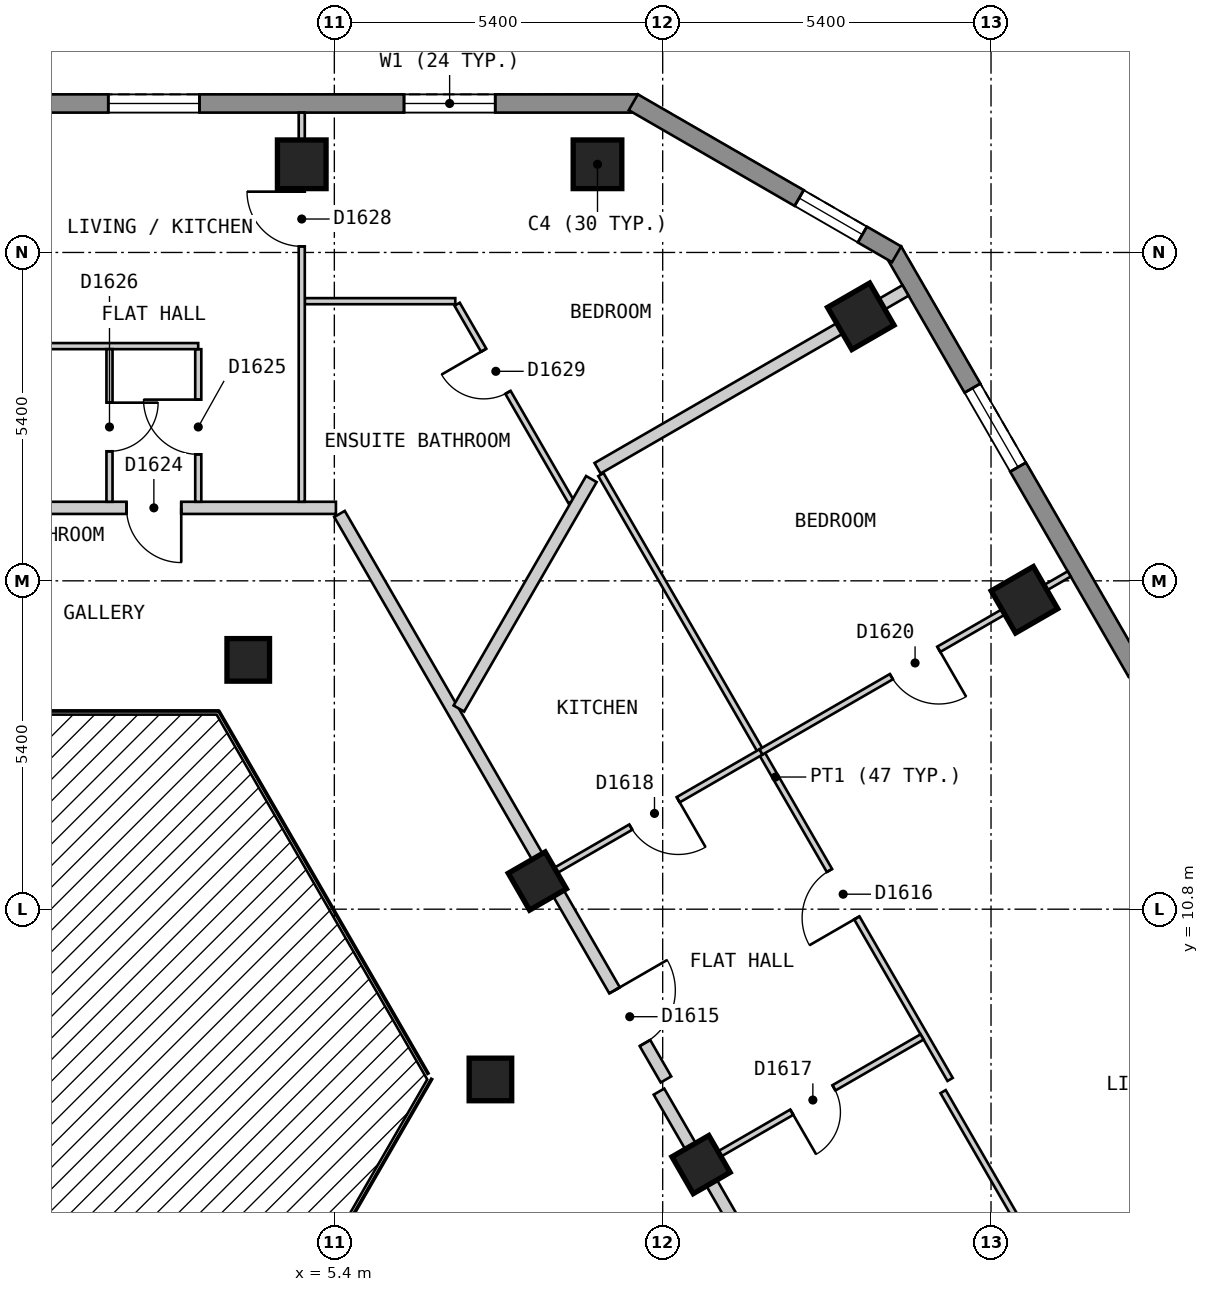
"""IFC4 building model, lengths in metres.
Left out: names, types, materials, properties, quantities, classifications, styles, units other than length and angle.
Written with IfcOpenShell. Run it as: python <this file> out.ifc"""

import sys

from ifc_helpers import new_model, si_unit, direction, frame, frame_2d, origin, origin_2d, place, context, subcontext, project, spatial, polyline, rectangle, outline, extrude, element, fill, save


model = new_model("IFC4")
c1 = context("Model", 3, precision=1e-05, world=origin(), true_north=direction((0.0, 1.0)))
c2 = subcontext(c1, "Body", "Model", "MODEL_VIEW")
j1 = project(units=[si_unit("LENGTHUNIT", "METRE"), si_unit("PLANEANGLEUNIT", "RADIAN")], contexts=[c1])
p1 = place(None, origin())
s1 = spatial("IfcSite", under=j1, at=p1, CompositionType="ELEMENT")
p2 = place(p1, origin())
s2 = spatial("IfcBuilding", under=s1, at=p2, CompositionType="ELEMENT")
p3 = place(p2, frame((0.0, 0.0, 163.2)))
s3 = spatial("IfcBuildingStorey", under=s2, at=p3, CompositionType="ELEMENT", Elevation=163.2)
for number, where, z_axis, x_axis in (
    (1, (9.728, 23.05, 0.0), (0.0, 0.0, 1.0), (-1.0, 0.0, 0.0)),
    (2, (4.864, 23.05, 0.0), (0.0, 0.0, 1.0), (-1.0, 0.0, 0.0)),
    (3, (16.75, 15.888, 0.0), (0.0, 0.0, 1.0), (-0.5, 0.866, 0.0)),
    (4, (14.058, 20.55, 0.0), (0.0, 0.0, 1.0), (-0.5, 0.866, 0.0)),
):
    element("IfcColumn", number, at=place(p3, frame(where, z_axis=z_axis, x_axis=x_axis)), inside=s3, PredefinedType="COLUMN", context=c2, shape_type="SweptSolid", body=[
        extrude(rectangle(XDim=0.8, YDim=0.8, at=origin_2d()), origin(), (0.0, 0.0, 1.0), 3.0),
    ])
for number, where, z_axis, x_axis in (
    (5, (11.431, 6.6, 0.0), (0.0, 0.0, 1.0), (-0.5, 0.866, 0.0)),
    (6, (7.967, 8.0, 0.0), (0.0, 0.0, 1.0), (1.0, 0.0, 0.0)),
    (7, (8.739, 11.263, 0.0), (0.0, 0.0, 1.0), (-0.5, 0.866, 0.0)),
    (8, (3.984, 14.9, 0.0), (0.0, 0.0, 1.0), (1.0, 0.0, 0.0)),
):
    element("IfcColumn", number, at=place(p3, frame(where, z_axis=z_axis, x_axis=x_axis)), inside=s3, PredefinedType="COLUMN", context=c2, shape_type="SweptSolid", body=[
        extrude(rectangle(XDim=0.7, YDim=0.7, at=origin_2d()), origin(), (0.0, 0.0, 1.0), 3.0),
    ])
p4 = place(p3, frame((10.392, 24.05, 0.0), z_axis=(0.0, 0.0, 1.0), x_axis=(-1.0, 0.0, 0.0)))
e9 = element("IfcWall", 9, at=p4, inside=s3, PredefinedType="SOLIDWALL", context=c2, shape_type="SweptSolid", body=[
    extrude(outline(polyline([(0.0, -0.15), (20.784, -0.15), (20.704, 0.15), (0.08, 0.15), (0.0, -0.15)])), origin(), (0.0, 0.0, 1.0), 2.7),
])
p5 = place(p4, frame((2.346, 0.0, 0.15)))
e10 = element("IfcOpeningElement", 10, at=p5, cuts=e9, PredefinedType="OPENING", context=c2, shape_type="SweptSolid", body=[
    extrude(rectangle(XDim=1.5, YDim=2.1, at=frame_2d((0.75, 1.05))), frame((0.0, 0.16, 0.0), z_axis=(0.0, -1.0, 0.0), x_axis=(1.0, 0.0, 0.0)), (0.0, 0.0, 1.0), 0.32),
])
p6 = place(p4, frame((7.21, 0.0, 0.15)))
e11 = element("IfcOpeningElement", 11, at=p6, cuts=e9, PredefinedType="OPENING", context=c2, shape_type="SweptSolid", body=[
    extrude(rectangle(XDim=1.5, YDim=2.1, at=frame_2d((0.75, 1.05))), frame((0.0, 0.16, 0.0), z_axis=(0.0, -1.0, 0.0), x_axis=(1.0, 0.0, 0.0)), (0.0, 0.0, 1.0), 0.32),
])
p7 = place(p4, frame((12.074, 0.0, 0.15)))
e12 = element("IfcOpeningElement", 12, at=p7, cuts=e9, PredefinedType="OPENING", context=c2, shape_type="SweptSolid", body=[
    extrude(rectangle(XDim=1.5, YDim=2.1, at=frame_2d((0.75, 1.05))), frame((0.0, 0.16, 0.0), z_axis=(0.0, -1.0, 0.0), x_axis=(1.0, 0.0, 0.0)), (0.0, 0.0, 1.0), 0.32),
])
p8 = place(p4, frame((16.938, 0.0, 0.15)))
e13 = element("IfcOpeningElement", 13, at=p8, cuts=e9, PredefinedType="OPENING", context=c2, shape_type="SweptSolid", body=[
    extrude(rectangle(XDim=1.5, YDim=2.1, at=frame_2d((0.75, 1.05))), frame((0.0, 0.16, 0.0), z_axis=(0.0, -1.0, 0.0), x_axis=(1.0, 0.0, 0.0)), (0.0, 0.0, 1.0), 0.32),
])
p9 = place(p3, frame((26.024, 1.825, 0.0), z_axis=(0.0, 0.0, 1.0), x_axis=(-0.500010537973, 0.866019319597, 0.0)))
e14 = element("IfcWall", 14, at=p9, inside=s3, PredefinedType="SOLIDWALL", context=c2, shape_type="SweptSolid", body=[
    extrude(outline(polyline([(0.0, -0.15), (22.863, -0.15), (22.783, 0.15), (0.08, 0.15), (0.0, -0.15)])), origin(), (0.0, 0.0, 1.0), 2.7),
])
p10 = place(p9, frame((2.606, 0.0, 0.15)))
e15 = element("IfcOpeningElement", 15, at=p10, cuts=e14, PredefinedType="OPENING", context=c2, shape_type="SweptSolid", body=[
    extrude(rectangle(XDim=1.5, YDim=2.1, at=frame_2d((0.75, 1.05))), frame((0.0, 0.16, 0.0), z_axis=(0.0, -1.0, 0.0), x_axis=(1.0, 0.0, 0.0)), (0.0, 0.0, 1.0), 0.32),
])
p11 = place(p9, frame((7.99, 0.0, 0.15)))
e16 = element("IfcOpeningElement", 16, at=p11, cuts=e14, PredefinedType="OPENING", context=c2, shape_type="SweptSolid", body=[
    extrude(rectangle(XDim=1.5, YDim=2.1, at=frame_2d((0.75, 1.05))), frame((0.0, 0.16, 0.0), z_axis=(0.0, -1.0, 0.0), x_axis=(1.0, 0.0, 0.0)), (0.0, 0.0, 1.0), 0.32),
])
p12 = place(p9, frame((13.373, 0.0, 0.15)))
e17 = element("IfcOpeningElement", 17, at=p12, cuts=e14, PredefinedType="OPENING", context=c2, shape_type="SweptSolid", body=[
    extrude(rectangle(XDim=1.5, YDim=2.1, at=frame_2d((0.75, 1.05))), frame((0.0, 0.16, 0.0), z_axis=(0.0, -1.0, 0.0), x_axis=(1.0, 0.0, 0.0)), (0.0, 0.0, 1.0), 0.32),
])
p13 = place(p9, frame((18.758, 0.0, 0.15)))
e18 = element("IfcOpeningElement", 18, at=p13, cuts=e14, PredefinedType="OPENING", context=c2, shape_type="SweptSolid", body=[
    extrude(rectangle(XDim=1.5, YDim=2.1, at=frame_2d((0.75, 1.05))), frame((0.0, 0.16, 0.0), z_axis=(0.0, -1.0, 0.0), x_axis=(1.0, 0.0, 0.0)), (0.0, 0.0, 1.0), 0.32),
])
p14 = place(p3, frame((14.647, 21.57, 0.0), z_axis=(0.0, 0.0, 1.0), x_axis=(-0.866022959057, 0.500004234368, 0.0)))
e19 = element("IfcWall", 19, at=p14, inside=s3, PredefinedType="SOLIDWALL", context=c2, shape_type="SweptSolid", body=[
    extrude(outline(polyline([(0.0, -0.15), (5.0, -0.15), (4.92, 0.15), (0.08, 0.15), (0.0, -0.15)])), origin(), (0.0, 0.0, 1.0), 2.7),
])
p15 = place(p14, frame((0.65, 0.0, 0.15)))
e20 = element("IfcOpeningElement", 20, at=p15, cuts=e19, PredefinedType="OPENING", context=c2, shape_type="SweptSolid", body=[
    extrude(rectangle(XDim=1.2, YDim=2.1, at=frame_2d((0.6, 1.05))), frame((0.0, 0.16, 0.0), z_axis=(0.0, -1.0, 0.0), x_axis=(1.0, 0.0, 0.0)), (0.0, 0.0, 1.0), 0.32),
])
p16 = place(p3, frame((10.739, 7.8, 0.0), z_axis=(0.0, 0.0, 1.0), x_axis=(0.499964311759, -0.86604600742, 0.0)))
e21 = element("IfcWall", 21, at=p16, inside=s3, PredefinedType="PARTITIONING", context=c2, shape_type="SweptSolid", body=[
    extrude(rectangle(XDim=9.583, YDim=0.2, at=frame_2d((4.792, 0.0))), origin(), (0.0, 0.0, 1.0), 2.7),
])
p17 = place(p3, frame((5.485, 17.3, 0.0), z_axis=(0.0, 0.0, 1.0), x_axis=(0.499965832213, -0.866045129667, 0.0)))
e22 = element("IfcWall", 22, at=p17, inside=s3, PredefinedType="PARTITIONING", context=c2, shape_type="SweptSolid", body=[
    extrude(rectangle(XDim=10.739, YDim=0.2, at=frame_2d((5.369, 0.0))), origin(), (0.0, 0.0, 1.0), 2.7),
])
p18 = place(p17, frame((9.047, 0.0, 0.0)))
e23 = element("IfcOpeningElement", 23, at=p18, cuts=e22, PredefinedType="OPENING", context=c2, shape_type="SweptSolid", body=[
    extrude(rectangle(XDim=1.0, YDim=2.1, at=frame_2d((0.5, 1.05))), frame((0.0, 0.11, 0.0), z_axis=(0.0, -1.0, 0.0), x_axis=(1.0, 0.0, 0.0)), (0.0, 0.0, 1.0), 0.22),
])
p19 = place(p3, frame((-5.312, 17.4, 0.0), z_axis=(0.0, 0.0, 1.0), x_axis=(1.0, 0.0, 0.0)))
e24 = element("IfcWall", 24, at=p19, inside=s3, PredefinedType="PARTITIONING", context=c2, shape_type="SweptSolid", body=[
    extrude(rectangle(XDim=10.738, YDim=0.2, at=frame_2d((5.369, 0.0))), origin(), (0.0, 0.0, 1.0), 2.7),
])
p20 = place(p19, frame((7.294, 0.0, 0.0)))
e25 = element("IfcOpeningElement", 25, at=p20, cuts=e24, PredefinedType="OPENING", context=c2, shape_type="SweptSolid", body=[
    extrude(rectangle(XDim=0.9, YDim=2.1, at=frame_2d((0.45, 1.05))), frame((0.0, 0.11, 0.0), z_axis=(0.0, -1.0, 0.0), x_axis=(1.0, 0.0, 0.0)), (0.0, 0.0, 1.0), 0.22),
])
p21 = place(p3, frame((7.419, 20.749, 0.0), z_axis=(0.0, 0.0, 1.0), x_axis=(0.499917691695, -0.866072919292, 0.0)))
e26 = element("IfcWall", 26, at=p21, inside=s3, PredefinedType="PARTITIONING", context=c2, shape_type="SweptSolid", body=[
    extrude(rectangle(XDim=3.753, YDim=0.1, at=frame_2d((1.876, 0.0))), origin(), (0.0, 0.0, 1.0), 2.7),
])
p22 = place(p21, frame((0.874, 0.0, 0.0)))
e27 = element("IfcOpeningElement", 27, at=p22, cuts=e26, PredefinedType="OPENING", context=c2, shape_type="SweptSolid", body=[
    extrude(rectangle(XDim=0.8, YDim=2.1, at=frame_2d((0.4, 1.05))), frame((0.0, 0.06, 0.0), z_axis=(0.0, -1.0, 0.0), x_axis=(1.0, 0.0, 0.0)), (0.0, 0.0, 1.0), 0.12),
])
p23 = place(p3, frame((15.412, 7.8, 0.0), z_axis=(0.0, 0.0, 1.0), x_axis=(0.499882970317, -0.866092960361, 0.0)))
e28 = element("IfcWall", 28, at=p23, inside=s3, PredefinedType="PARTITIONING", context=c2, shape_type="SweptSolid", body=[
    extrude(rectangle(XDim=4.433, YDim=0.1, at=frame_2d((2.216, 0.0))), origin(), (0.0, 0.0, 1.0), 2.7),
])
p24 = place(p3, frame((9.784, 17.947, 0.0), z_axis=(0.0, 0.0, 1.0), x_axis=(0.500016228266, -0.866016034188, 0.0)))
e29 = element("IfcWall", 29, at=p24, inside=s3, PredefinedType="PARTITIONING", context=c2, shape_type="SweptSolid", body=[
    extrude(rectangle(XDim=11.486, YDim=0.1, at=frame_2d((5.743, 0.0))), origin(), (0.0, 0.0, 1.0), 2.7),
])
p25 = place(p24, frame((7.518, 0.0, 0.0)))
e30 = element("IfcOpeningElement", 30, at=p25, cuts=e29, PredefinedType="OPENING", context=c2, shape_type="SweptSolid", body=[
    extrude(rectangle(XDim=0.9, YDim=2.1, at=frame_2d((0.45, 1.05))), frame((0.0, 0.06, 0.0), z_axis=(0.0, -1.0, 0.0), x_axis=(1.0, 0.0, 0.0)), (0.0, 0.0, 1.0), 0.12),
])
p26 = place(p3, frame((3.162, 20.009, 0.0), z_axis=(0.0, 0.0, 1.0), x_axis=(0.0, -1.0, 0.0)))
e31 = element("IfcWall", 31, at=p26, inside=s3, PredefinedType="PARTITIONING", context=c2, shape_type="SweptSolid", body=[
    extrude(rectangle(XDim=2.509, YDim=0.1, at=frame_2d((1.254, 0.0))), origin(), (0.0, 0.0, 1.0), 2.7),
])
p27 = place(p26, frame((0.829, 0.0, 0.0)))
e32 = element("IfcOpeningElement", 32, at=p27, cuts=e31, PredefinedType="OPENING", context=c2, shape_type="SweptSolid", body=[
    extrude(rectangle(XDim=0.9, YDim=2.1, at=frame_2d((0.45, 1.05))), frame((0.0, 0.06, 0.0), z_axis=(0.0, -1.0, 0.0), x_axis=(1.0, 0.0, 0.0)), (0.0, 0.0, 1.0), 0.12),
])
p28 = place(p3, frame((0.05, 20.06, 0.0), z_axis=(0.0, 0.0, 1.0), x_axis=(1.0, 0.0, 0.0)))
e33 = element("IfcWall", 33, at=p28, inside=s3, PredefinedType="PARTITIONING", context=c2, shape_type="SweptSolid", body=[
    extrude(rectangle(XDim=3.111, YDim=0.1, at=frame_2d((1.555, 0.0))), origin(), (0.0, 0.0, 1.0), 2.7),
])
p29 = place(p3, frame((4.914, 20.799, 0.0), z_axis=(0.0, 0.0, 1.0), x_axis=(1.0, 0.0, 0.0)))
e34 = element("IfcWall", 34, at=p29, inside=s3, PredefinedType="PARTITIONING", context=c2, shape_type="SweptSolid", body=[
    extrude(rectangle(XDim=2.475, YDim=0.1, at=frame_2d((1.237, 0.0))), origin(), (0.0, 0.0, 1.0), 2.7),
])
p30 = place(p3, frame((4.864, 17.5, 0.0), z_axis=(0.0, 0.0, 1.0), x_axis=(0.0, 1.0, 0.0)))
e35 = element("IfcWall", 35, at=p30, inside=s3, PredefinedType="PARTITIONING", context=c2, shape_type="SweptSolid", body=[
    extrude(rectangle(XDim=6.4, YDim=0.1, at=frame_2d((3.2, 0.0))), origin(), (0.0, 0.0, 1.0), 2.7),
])
p31 = place(p30, frame((4.2, 0.0, 0.0)))
e36 = element("IfcOpeningElement", 36, at=p31, cuts=e35, PredefinedType="OPENING", context=c2, shape_type="SweptSolid", body=[
    extrude(rectangle(XDim=0.9, YDim=2.1, at=frame_2d((0.45, 1.05))), frame((0.0, 0.06, 0.0), z_axis=(0.0, -1.0, 0.0), x_axis=(1.0, 0.0, 0.0)), (0.0, 0.0, 1.0), 0.12),
])
p32 = place(p3, frame((1.702, 17.5, 0.0), z_axis=(0.0, 0.0, 1.0), x_axis=(0.0, 1.0, 0.0)))
e37 = element("IfcWall", 37, at=p32, inside=s3, PredefinedType="PARTITIONING", context=c2, shape_type="SweptSolid", body=[
    extrude(rectangle(XDim=2.51, YDim=0.1, at=frame_2d((1.255, 0.0))), origin(), (0.0, 0.0, 1.0), 2.7),
])
p33 = place(p32, frame((0.83, 0.0, 0.0)))
e38 = element("IfcOpeningElement", 38, at=p33, cuts=e37, PredefinedType="OPENING", context=c2, shape_type="SweptSolid", body=[
    extrude(rectangle(XDim=0.8, YDim=2.1, at=frame_2d((0.4, 1.05))), frame((0.0, 0.06, 0.0), z_axis=(0.0, -1.0, 0.0), x_axis=(1.0, 0.0, 0.0)), (0.0, 0.0, 1.0), 0.12),
])
p34 = place(p3, frame((14.21, 1.987, 0.0), z_axis=(0.0, 0.0, 1.0), x_axis=(0.866022959057, 0.500004234368, 0.0)))
e39 = element("IfcWall", 39, at=p34, inside=s3, PredefinedType="PARTITIONING", context=c2, shape_type="SweptSolid", body=[
    extrude(rectangle(XDim=10.0, YDim=0.1, at=frame_2d((5.0, 0.0))), origin(), (0.0, 0.0, 1.0), 2.7),
])
p35 = place(p34, frame((6.523, 0.0, 0.0)))
e40 = element("IfcOpeningElement", 40, at=p35, cuts=e39, PredefinedType="OPENING", context=c2, shape_type="SweptSolid", body=[
    extrude(rectangle(XDim=0.9, YDim=2.1, at=frame_2d((0.45, 1.05))), frame((0.0, 0.06, 0.0), z_axis=(0.0, -1.0, 0.0), x_axis=(1.0, 0.0, 0.0)), (0.0, 0.0, 1.0), 0.12),
])
p36 = place(p3, frame((11.518, 6.65, 0.0), z_axis=(0.0, 0.0, 1.0), x_axis=(0.865949381454, 0.500131651427, 0.0)))
e41 = element("IfcWall", 41, at=p36, inside=s3, PredefinedType="PARTITIONING", context=c2, shape_type="SweptSolid", body=[
    extrude(rectangle(XDim=4.097, YDim=0.1, at=frame_2d((2.049, 0.0))), origin(), (0.0, 0.0, 1.0), 2.7),
])
p37 = place(p36, frame((1.623, 0.0, 0.0)))
e42 = element("IfcOpeningElement", 42, at=p37, cuts=e41, PredefinedType="OPENING", context=c2, shape_type="SweptSolid", body=[
    extrude(rectangle(XDim=0.8, YDim=2.1, at=frame_2d((0.4, 1.05))), frame((0.0, 0.06, 0.0), z_axis=(0.0, -1.0, 0.0), x_axis=(1.0, 0.0, 0.0)), (0.0, 0.0, 1.0), 0.12),
])
p38 = place(p3, frame((8.999, 11.413, 0.0), z_axis=(0.0, 0.0, 1.0), x_axis=(0.866076396086, 0.499911668341, 0.0)))
e43 = element("IfcWall", 43, at=p38, inside=s3, PredefinedType="PARTITIONING", context=c2, shape_type="SweptSolid", body=[
    extrude(rectangle(XDim=3.947, YDim=0.1, at=frame_2d((1.973, 0.0))), origin(), (0.0, 0.0, 1.0), 2.7),
])
p39 = place(p38, frame((1.474, 0.0, 0.0)))
e44 = element("IfcOpeningElement", 44, at=p39, cuts=e43, PredefinedType="OPENING", context=c2, shape_type="SweptSolid", body=[
    extrude(rectangle(XDim=0.9, YDim=2.1, at=frame_2d((0.45, 1.05))), frame((0.0, 0.06, 0.0), z_axis=(0.0, -1.0, 0.0), x_axis=(1.0, 0.0, 0.0)), (0.0, 0.0, 1.0), 0.12),
])
p40 = place(p3, frame((7.448, 14.1, 0.0), z_axis=(0.0, 0.0, 1.0), x_axis=(0.500013426303, 0.866017651966, 0.0)))
e45 = element("IfcWall", 45, at=p40, inside=s3, PredefinedType="PARTITIONING", context=c2, shape_type="SweptSolid", body=[
    extrude(rectangle(XDim=4.358, YDim=0.2, at=frame_2d((2.179, 0.0))), origin(), (0.0, 0.0, 1.0), 2.7),
])
p41 = place(p3, frame((9.729, 18.051, 0.0), z_axis=(0.0, 0.0, 1.0), x_axis=(0.866038213712, 0.499977811898, 0.0)))
e46 = element("IfcWall", 46, at=p41, inside=s3, PredefinedType="PARTITIONING", context=c2, shape_type="SweptSolid", body=[
    extrude(rectangle(XDim=5.848, YDim=0.2, at=frame_2d((2.924, 0.0))), origin(), (0.0, 0.0, 1.0), 2.7),
])
p42 = place(p3, frame((12.417, 13.386, 0.0), z_axis=(0.0, 0.0, 1.0), x_axis=(0.86599873886, 0.50004618216, 0.0)))
e47 = element("IfcWall", 47, at=p42, inside=s3, PredefinedType="PARTITIONING", context=c2, shape_type="SweptSolid", body=[
    extrude(rectangle(XDim=5.854, YDim=0.1, at=frame_2d((2.927, 0.0))), origin(), (0.0, 0.0, 1.0), 2.7),
])
p43 = place(p42, frame((2.476, 0.0, 0.0)))
e48 = element("IfcOpeningElement", 48, at=p43, cuts=e47, PredefinedType="OPENING", context=c2, shape_type="SweptSolid", body=[
    extrude(rectangle(XDim=0.9, YDim=2.1, at=frame_2d((0.45, 1.05))), frame((0.0, 0.06, 0.0), z_axis=(0.0, -1.0, 0.0), x_axis=(1.0, 0.0, 0.0)), (0.0, 0.0, 1.0), 0.12),
])
p44 = place(p5, origin())
e49 = element("IfcWindow", 49, at=p44, inside=s3, PartitioningType="SINGLE_PANEL", PredefinedType="WINDOW", context=c2, shape_type="SweptSolid", body=[
    extrude(rectangle(XDim=1.5, YDim=2.1, at=frame_2d((0.75, 1.05))), frame((0.0, 0.03, 0.0), z_axis=(0.0, -1.0, 0.0), x_axis=(1.0, 0.0, 0.0)), (0.0, 0.0, 1.0), 0.06),
])
fill(e10, e49)
p45 = place(p6, origin())
e50 = element("IfcWindow", 50, at=p45, inside=s3, PartitioningType="SINGLE_PANEL", PredefinedType="WINDOW", context=c2, shape_type="SweptSolid", body=[
    extrude(rectangle(XDim=1.5, YDim=2.1, at=frame_2d((0.75, 1.05))), frame((0.0, 0.03, 0.0), z_axis=(0.0, -1.0, 0.0), x_axis=(1.0, 0.0, 0.0)), (0.0, 0.0, 1.0), 0.06),
])
fill(e11, e50)
p46 = place(p13, origin())
e51 = element("IfcWindow", 51, at=p46, inside=s3, PartitioningType="SINGLE_PANEL", PredefinedType="WINDOW", context=c2, shape_type="SweptSolid", body=[
    extrude(rectangle(XDim=1.5, YDim=2.1, at=frame_2d((0.75, 1.05))), frame((0.0, 0.03, 0.0), z_axis=(0.0, -1.0, 0.0), x_axis=(1.0, 0.0, 0.0)), (0.0, 0.0, 1.0), 0.06),
])
fill(e18, e51)
p47 = place(p15, origin())
e52 = element("IfcWindow", 52, at=p47, inside=s3, PartitioningType="SINGLE_PANEL", PredefinedType="WINDOW", context=c2, shape_type="SweptSolid", body=[
    extrude(rectangle(XDim=1.2, YDim=2.1, at=frame_2d((0.6, 1.05))), frame((0.0, 0.03, 0.0), z_axis=(0.0, -1.0, 0.0), x_axis=(1.0, 0.0, 0.0)), (0.0, 0.0, 1.0), 0.06),
])
fill(e20, e52)
p48 = place(p18, origin())
e53 = element("IfcDoor", 53, at=p48, inside=s3, OperationType="SINGLE_SWING_LEFT", PredefinedType="DOOR", context=c2, shape_type="SweptSolid", body=[
    extrude(rectangle(XDim=1.0, YDim=2.1, at=frame_2d((0.5, 1.05))), frame((0.0, 0.025, 0.0), z_axis=(0.0, -1.0, 0.0), x_axis=(1.0, 0.0, 0.0)), (0.0, 0.0, 1.0), 0.05),
])
fill(e23, e53)
p49 = place(p25, origin())
e54 = element("IfcDoor", 54, at=p49, inside=s3, OperationType="SINGLE_SWING_RIGHT", PredefinedType="DOOR", context=c2, shape_type="SweptSolid", body=[
    extrude(rectangle(XDim=0.9, YDim=2.1, at=frame_2d((0.45, 1.05))), frame((0.0, 0.025, 0.0), z_axis=(0.0, -1.0, 0.0), x_axis=(1.0, 0.0, 0.0)), (0.0, 0.0, 1.0), 0.05),
])
fill(e30, e54)
p50 = place(p37, origin())
e55 = element("IfcDoor", 55, at=p50, inside=s3, OperationType="SINGLE_SWING_LEFT", PredefinedType="DOOR", context=c2, shape_type="SweptSolid", body=[
    extrude(rectangle(XDim=0.8, YDim=2.1, at=frame_2d((0.4, 1.05))), frame((0.0, 0.025, 0.0), z_axis=(0.0, -1.0, 0.0), x_axis=(1.0, 0.0, 0.0)), (0.0, 0.0, 1.0), 0.05),
])
fill(e42, e55)
p51 = place(p39, origin())
e56 = element("IfcDoor", 56, at=p51, inside=s3, OperationType="SINGLE_SWING_RIGHT", PredefinedType="DOOR", context=c2, shape_type="SweptSolid", body=[
    extrude(rectangle(XDim=0.9, YDim=2.1, at=frame_2d((0.45, 1.05))), frame((0.0, 0.025, 0.0), z_axis=(0.0, -1.0, 0.0), x_axis=(1.0, 0.0, 0.0)), (0.0, 0.0, 1.0), 0.05),
])
fill(e44, e56)
p52 = place(p43, origin())
e57 = element("IfcDoor", 57, at=p52, inside=s3, OperationType="SINGLE_SWING_RIGHT", PredefinedType="DOOR", context=c2, shape_type="SweptSolid", body=[
    extrude(rectangle(XDim=0.9, YDim=2.1, at=frame_2d((0.45, 1.05))), frame((0.0, 0.025, 0.0), z_axis=(0.0, -1.0, 0.0), x_axis=(1.0, 0.0, 0.0)), (0.0, 0.0, 1.0), 0.05),
])
fill(e48, e57)
p53 = place(p20, origin())
e58 = element("IfcDoor", 58, at=p53, inside=s3, OperationType="SINGLE_SWING_RIGHT", PredefinedType="DOOR", context=c2, shape_type="SweptSolid", body=[
    extrude(rectangle(XDim=0.9, YDim=2.1, at=frame_2d((0.45, 1.05))), frame((0.0, 0.025, 0.0), z_axis=(0.0, -1.0, 0.0), x_axis=(1.0, 0.0, 0.0)), (0.0, 0.0, 1.0), 0.05),
])
fill(e25, e58)
p54 = place(p27, origin())
e59 = element("IfcDoor", 59, at=p54, inside=s3, OperationType="SINGLE_SWING_LEFT", PredefinedType="DOOR", context=c2, shape_type="SweptSolid", body=[
    extrude(rectangle(XDim=0.9, YDim=2.1, at=frame_2d((0.45, 1.05))), frame((0.0, 0.025, 0.0), z_axis=(0.0, -1.0, 0.0), x_axis=(1.0, 0.0, 0.0)), (0.0, 0.0, 1.0), 0.05),
])
fill(e32, e59)
p55 = place(p33, origin())
e60 = element("IfcDoor", 60, at=p55, inside=s3, OperationType="SINGLE_SWING_RIGHT", PredefinedType="DOOR", context=c2, shape_type="SweptSolid", body=[
    extrude(rectangle(XDim=0.8, YDim=2.1, at=frame_2d((0.4, 1.05))), frame((0.0, 0.025, 0.0), z_axis=(0.0, -1.0, 0.0), x_axis=(1.0, 0.0, 0.0)), (0.0, 0.0, 1.0), 0.05),
])
fill(e38, e60)
p56 = place(p31, origin())
e61 = element("IfcDoor", 61, at=p56, inside=s3, OperationType="SINGLE_SWING_RIGHT", PredefinedType="DOOR", context=c2, shape_type="SweptSolid", body=[
    extrude(rectangle(XDim=0.9, YDim=2.1, at=frame_2d((0.45, 1.05))), frame((0.0, 0.025, 0.0), z_axis=(0.0, -1.0, 0.0), x_axis=(1.0, 0.0, 0.0)), (0.0, 0.0, 1.0), 0.05),
])
fill(e36, e61)
p57 = place(p22, origin())
e62 = element("IfcDoor", 62, at=p57, inside=s3, OperationType="SINGLE_SWING_LEFT", PredefinedType="DOOR", context=c2, shape_type="SweptSolid", body=[
    extrude(rectangle(XDim=0.8, YDim=2.1, at=frame_2d((0.4, 1.05))), frame((0.0, 0.025, 0.0), z_axis=(0.0, -1.0, 0.0), x_axis=(1.0, 0.0, 0.0)), (0.0, 0.0, 1.0), 0.05),
])
fill(e27, e62)
save(model, sys.argv[1])
